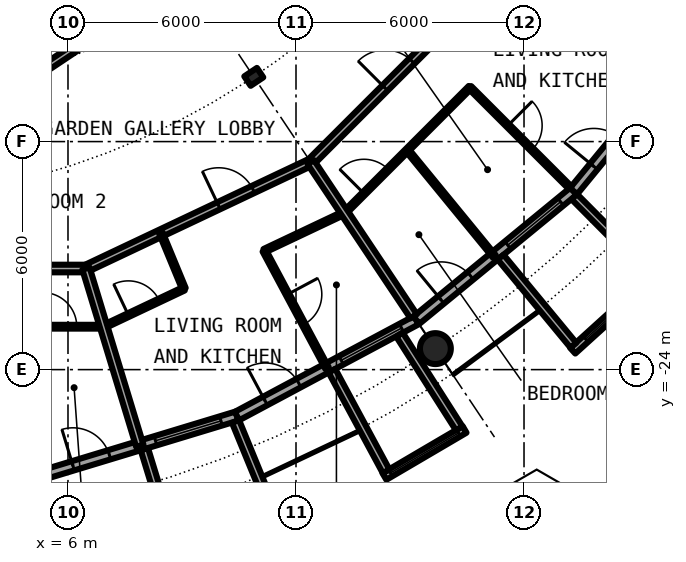
"""IFC4 building model, lengths in metres.
Left out: names, types, materials, properties, quantities, classifications, styles, units other than length and angle.
Written with IfcOpenShell. Run it as: python <this file> out.ifc"""

import sys

from ifc_helpers import new_model, si_unit, direction, frame, frame_2d, origin, origin_2d, place, context, subcontext, project, spatial, rectangle, circle, hollow_circle, i_section, extrude, element, fill, save


model = new_model("IFC4")
c1 = context("Model", 3, precision=1e-05, world=origin(), true_north=direction((0.0, 1.0)))
c2 = subcontext(c1, "Body", "Model", "MODEL_VIEW")
j1 = project(units=[si_unit("LENGTHUNIT", "METRE"), si_unit("PLANEANGLEUNIT", "RADIAN")], contexts=[c1])
p1 = place(None, origin())
s1 = spatial("IfcSite", under=j1, at=p1, CompositionType="ELEMENT")
p2 = place(p1, origin())
s2 = spatial("IfcBuilding", under=s1, at=p2, CompositionType="ELEMENT")
p3 = place(p2, frame((0.0, 0.0, 218.8)))
s3 = spatial("IfcBuildingStorey", under=s2, at=p3, CompositionType="ELEMENT", Elevation=218.8)
p4 = place(p3, frame((15.667, -23.448, 0.0), z_axis=(0.0, 0.0, 1.0), x_axis=(1.0, 0.0, 0.0)))
e1 = element("IfcColumn", 1, at=p4, inside=s3, PredefinedType="COLUMN", context=c2, shape_type="SweptSolid", body=[
    extrude(hollow_circle(Radius=0.406, WallThickness=0.03, at=origin_2d()), origin(), (0.0, 0.0, 1.0), 3.05),
])
p5 = place(p3, frame((10.889, -16.297, 0.0), z_axis=(0.0, 0.0, 1.0), x_axis=(0.55557023302, -0.831469612303, 0.0)))
e2 = element("IfcColumn", 2, at=p5, inside=s3, PredefinedType="COLUMN", context=c2, shape_type="SweptSolid", body=[
    extrude(i_section(OverallWidth=0.3, OverallDepth=0.4, WebThickness=0.013, FlangeThickness=0.024, FilletRadius=0.027, at=origin_2d()), origin(), (0.0, 0.0, 1.0), 3.05),
])
p6 = place(p3, frame((5.326, -26.775, 0.0), z_axis=(0.0, 0.0, 1.0), x_axis=(0.956965678721, 0.290201119486, 0.0)))
e3 = element("IfcWall", 3, at=p6, inside=s3, PredefinedType="SOLIDWALL", context=c2, shape_type="SweptSolid", body=[
    extrude(rectangle(XDim=5.351, YDim=0.25, at=frame_2d((2.676, 0.0))), origin(), (0.0, 0.0, 1.0), 2.65),
])
p7 = place(p6, frame((0.841, 0.0, 0.0)))
e4 = element("IfcOpeningElement", 4, at=p7, cuts=e3, PredefinedType="OPENING", context=c2, shape_type="SweptSolid", body=[
    extrude(rectangle(XDim=1.0, YDim=2.2, at=frame_2d((0.5, 1.1))), frame((0.0, 0.135, 0.0), z_axis=(0.0, -1.0, 0.0), x_axis=(1.0, 0.0, 0.0)), (0.0, 0.0, 1.0), 0.27),
])
p8 = place(p6, frame((3.111, 0.0, 0.3)))
e5 = element("IfcOpeningElement", 5, at=p8, cuts=e3, PredefinedType="OPENING", context=c2, shape_type="SweptSolid", body=[
    extrude(rectangle(XDim=1.8, YDim=2.1, at=frame_2d((0.9, 1.05))), frame((0.0, 0.135, 0.0), z_axis=(0.0, -1.0, 0.0), x_axis=(1.0, 0.0, 0.0)), (0.0, 0.0, 1.0), 0.27),
])
p9 = place(p3, frame((8.009, -26.092, -0.03), z_axis=(0.0, 0.0, 1.0), x_axis=(0.293406695073, -0.955987715029, 0.0)))
e6 = element("IfcWall", 6, at=p9, inside=s3, PredefinedType="SOLIDWALL", context=c2, shape_type="SweptSolid", body=[
    extrude(rectangle(XDim=3.006, YDim=0.2, at=frame_2d((1.503, 0.0))), origin(), (0.0, 0.0, 1.0), 2.68),
])
p10 = place(p3, frame((10.409, -25.364, -0.03), z_axis=(0.0, 0.0, 1.0), x_axis=(0.379509886562, -0.925187681501, 0.0)))
e7 = element("IfcWall", 7, at=p10, inside=s3, PredefinedType="SOLIDWALL", context=c2, shape_type="SweptSolid", body=[
    extrude(rectangle(XDim=2.883, YDim=0.2, at=frame_2d((1.441, 0.0))), origin(), (0.0, 0.0, 1.0), 2.68),
])
p11 = place(p3, frame((10.447, -25.222, 0.0), z_axis=(0.0, 0.0, 1.0), x_axis=(0.881915646801, 0.471407246368, 0.0)))
e8 = element("IfcWall", 8, at=p11, inside=s3, PredefinedType="SOLIDWALL", context=c2, shape_type="SweptSolid", body=[
    extrude(rectangle(XDim=5.352, YDim=0.25, at=frame_2d((2.676, 0.0))), origin(), (0.0, 0.0, 1.0), 2.65),
])
p12 = place(p11, frame((0.841, 0.0, 0.0)))
e9 = element("IfcOpeningElement", 9, at=p12, cuts=e8, PredefinedType="OPENING", context=c2, shape_type="SweptSolid", body=[
    extrude(rectangle(XDim=1.0, YDim=2.2, at=frame_2d((0.5, 1.1))), frame((0.0, 0.135, 0.0), z_axis=(0.0, -1.0, 0.0), x_axis=(1.0, 0.0, 0.0)), (0.0, 0.0, 1.0), 0.27),
])
p13 = place(p11, frame((3.111, 0.0, 0.3)))
e10 = element("IfcOpeningElement", 10, at=p13, cuts=e8, PredefinedType="OPENING", context=c2, shape_type="SweptSolid", body=[
    extrude(rectangle(XDim=1.8, YDim=2.1, at=frame_2d((0.9, 1.05))), frame((0.0, 0.135, 0.0), z_axis=(0.0, -1.0, 0.0), x_axis=(1.0, 0.0, 0.0)), (0.0, 0.0, 1.0), 0.27),
])
p14 = place(p3, frame((14.327, -26.812, -0.03), z_axis=(0.0, 0.0, 1.0), x_axis=(0.862403467503, 0.506221551535, 0.0)))
e11 = element("IfcWall", 11, at=p14, inside=s3, PredefinedType="SOLIDWALL", context=c2, shape_type="SweptSolid", body=[
    extrude(rectangle(XDim=2.446, YDim=0.2, at=frame_2d((1.223, 0.0))), origin(), (0.0, 0.0, 1.0), 2.68),
])
p15 = place(p14, frame((0.183, 0.0, 0.33)))
e12 = element("IfcOpeningElement", 12, at=p15, cuts=e11, PredefinedType="OPENING", context=c2, shape_type="SweptSolid", body=[
    extrude(circle(Radius=1.04, at=frame_2d((1.04, 1.04))), frame((0.0, 0.11, 0.0), z_axis=(0.0, -1.0, 0.0), x_axis=(1.0, 0.0, 0.0)), (0.0, 0.0, 1.0), 0.22),
])
p16 = place(p3, frame((12.945, -24.029, -0.03), z_axis=(0.0, 0.0, 1.0), x_axis=(0.474424310775, -0.88029629861, 0.0)))
e13 = element("IfcWall", 13, at=p16, inside=s3, PredefinedType="SOLIDWALL", context=c2, shape_type="SweptSolid", body=[
    extrude(rectangle(XDim=3.006, YDim=0.2, at=frame_2d((1.503, 0.0))), origin(), (0.0, 0.0, 1.0), 2.68),
])
p17 = place(p3, frame((14.722, -23.079, -0.03), z_axis=(0.0, 0.0, 1.0), x_axis=(0.537572179146, -0.843217737129, 0.0)))
e14 = element("IfcWall", 14, at=p17, inside=s3, PredefinedType="SOLIDWALL", context=c2, shape_type="SweptSolid", body=[
    extrude(rectangle(XDim=2.924, YDim=0.2, at=frame_2d((1.462, 0.0))), origin(), (0.0, 0.0, 1.0), 2.68),
])
p18 = place(p3, frame((15.167, -22.699, 0.0), z_axis=(0.0, 0.0, 1.0), x_axis=(0.773019449054, 0.634382322723, 0.0)))
e15 = element("IfcWall", 15, at=p18, inside=s3, PredefinedType="SOLIDWALL", context=c2, shape_type="SweptSolid", body=[
    extrude(rectangle(XDim=5.352, YDim=0.25, at=frame_2d((2.676, 0.0))), origin(), (0.0, 0.0, 1.0), 2.65),
])
p19 = place(p18, frame((0.841, 0.0, 0.0)))
e16 = element("IfcOpeningElement", 16, at=p19, cuts=e15, PredefinedType="OPENING", context=c2, shape_type="SweptSolid", body=[
    extrude(rectangle(XDim=1.0, YDim=2.2, at=frame_2d((0.5, 1.1))), frame((0.0, 0.135, 0.0), z_axis=(0.0, -1.0, 0.0), x_axis=(1.0, 0.0, 0.0)), (0.0, 0.0, 1.0), 0.27),
])
p20 = place(p18, frame((3.111, 0.0, 0.3)))
e17 = element("IfcOpeningElement", 17, at=p20, cuts=e15, PredefinedType="OPENING", context=c2, shape_type="SweptSolid", body=[
    extrude(rectangle(XDim=1.8, YDim=2.1, at=frame_2d((0.9, 1.05))), frame((0.0, 0.135, 0.0), z_axis=(0.0, -1.0, 0.0), x_axis=(1.0, 0.0, 0.0)), (0.0, 0.0, 1.0), 0.27),
])
p21 = place(p3, frame((19.282, -23.503, -0.03), z_axis=(0.0, 0.0, 1.0), x_axis=(0.740998365753, 0.671506829416, 0.0)))
e18 = element("IfcWall", 18, at=p21, inside=s3, PredefinedType="SOLIDWALL", context=c2, shape_type="SweptSolid", body=[
    extrude(rectangle(XDim=2.993, YDim=0.2, at=frame_2d((1.497, 0.0))), origin(), (0.0, 0.0, 1.0), 2.68),
])
p22 = place(p21, frame((0.457, 0.0, 0.33)))
e19 = element("IfcOpeningElement", 19, at=p22, cuts=e18, PredefinedType="OPENING", context=c2, shape_type="SweptSolid", body=[
    extrude(circle(Radius=1.04, at=frame_2d((1.04, 1.04))), frame((0.0, 0.11, 0.0), z_axis=(0.0, -1.0, 0.0), x_axis=(1.0, 0.0, 0.0)), (0.0, 0.0, 1.0), 0.22),
])
p23 = place(p3, frame((17.384, -21.041, -0.03), z_axis=(0.0, 0.0, 1.0), x_axis=(0.63709551667, -0.770784861449, 0.0)))
e20 = element("IfcWall", 20, at=p23, inside=s3, PredefinedType="SOLIDWALL", context=c2, shape_type="SweptSolid", body=[
    extrude(rectangle(XDim=3.006, YDim=0.2, at=frame_2d((1.503, 0.0))), origin(), (0.0, 0.0, 1.0), 2.68),
])
p24 = place(p3, frame((19.323, -19.45, -0.03), z_axis=(0.0, 0.0, 1.0), x_axis=(0.704476739375, -0.709727076896, 0.0)))
e21 = element("IfcWall", 21, at=p24, inside=s3, PredefinedType="SOLIDWALL", context=c2, shape_type="SweptSolid", body=[
    extrude(rectangle(XDim=2.883, YDim=0.2, at=frame_2d((1.441, 0.0))), origin(), (0.0, 0.0, 1.0), 2.68),
])
p25 = place(p3, frame((19.304, -19.304, 0.0), z_axis=(0.0, 0.0, 1.0), x_axis=(0.634382322723, 0.773019449054, 0.0)))
e22 = element("IfcWall", 22, at=p25, inside=s3, PredefinedType="SOLIDWALL", context=c2, shape_type="SweptSolid", body=[
    extrude(rectangle(XDim=5.352, YDim=0.25, at=frame_2d((2.676, 0.0))), origin(), (0.0, 0.0, 1.0), 2.65),
])
p26 = place(p25, frame((0.841, 0.0, 0.0)))
e23 = element("IfcOpeningElement", 23, at=p26, cuts=e22, PredefinedType="OPENING", context=c2, shape_type="SweptSolid", body=[
    extrude(rectangle(XDim=1.0, YDim=2.2, at=frame_2d((0.5, 1.1))), frame((0.0, 0.135, 0.0), z_axis=(0.0, -1.0, 0.0), x_axis=(1.0, 0.0, 0.0)), (0.0, 0.0, 1.0), 0.27),
])
p27 = place(p25, frame((3.111, 0.0, 0.3)))
e24 = element("IfcOpeningElement", 24, at=p27, cuts=e22, PredefinedType="OPENING", context=c2, shape_type="SweptSolid", body=[
    extrude(rectangle(XDim=1.8, YDim=2.1, at=frame_2d((0.9, 1.05))), frame((0.0, 0.135, 0.0), z_axis=(0.0, -1.0, 0.0), x_axis=(1.0, 0.0, 0.0)), (0.0, 0.0, 1.0), 0.27),
])
p28 = place(p3, frame((6.939, -22.872, 0.0), z_axis=(0.0, 0.0, 1.0), x_axis=(0.903888765148, 0.427767577359, 0.0)))
e25 = element("IfcWall", 25, at=p28, inside=s3, PredefinedType="PARTITIONING", context=c2, shape_type="SweptSolid", body=[
    extrude(rectangle(XDim=2.338, YDim=0.1, at=frame_2d((1.169, 0.0))), origin(), (0.0, 0.0, 1.0), 2.65),
])
p29 = place(p28, frame((0.718, 0.0, 0.0)))
e26 = element("IfcOpeningElement", 26, at=p29, cuts=e25, PredefinedType="OPENING", context=c2, shape_type="SweptSolid", body=[
    extrude(rectangle(XDim=0.9, YDim=2.3, at=frame_2d((0.45, 1.15))), frame((0.0, 0.06, 0.0), z_axis=(0.0, -1.0, 0.0), x_axis=(1.0, 0.0, 0.0)), (0.0, 0.0, 1.0), 0.12),
])
p30 = place(p3, frame((11.165, -20.872, 0.0), z_axis=(0.0, 0.0, 1.0), x_axis=(0.903888765148, 0.427767577359, 0.0)))
e27 = element("IfcWall", 27, at=p30, inside=s3, PredefinedType="PARTITIONING", context=c2, shape_type="SweptSolid", body=[
    extrude(rectangle(XDim=2.338, YDim=0.1, at=frame_2d((1.169, 0.0))), origin(), (0.0, 0.0, 1.0), 2.65),
])
p31 = place(p3, frame((13.285, -19.869, 0.0), z_axis=(0.0, 0.0, 1.0), x_axis=(0.706923494552, 0.707290020325, 0.0)))
e28 = element("IfcWall", 28, at=p31, inside=s3, PredefinedType="PARTITIONING", context=c2, shape_type="SweptSolid", body=[
    extrude(rectangle(XDim=4.663, YDim=0.1, at=frame_2d((2.331, 0.0))), origin(), (0.0, 0.0, 1.0), 2.65),
])
p32 = place(p31, frame((0.712, 0.0, 0.0)))
e29 = element("IfcOpeningElement", 29, at=p32, cuts=e28, PredefinedType="OPENING", context=c2, shape_type="SweptSolid", body=[
    extrude(rectangle(XDim=0.9, YDim=2.3, at=frame_2d((0.45, 1.15))), frame((0.0, 0.06, 0.0), z_axis=(0.0, -1.0, 0.0), x_axis=(1.0, 0.0, 0.0)), (0.0, 0.0, 1.0), 0.12),
])
p33 = place(p3, frame((0.0, -22.871, 0.0), z_axis=(0.0, 0.0, 1.0), x_axis=(1.0, 0.0, 0.0)))
e30 = element("IfcWall", 30, at=p33, inside=s3, PredefinedType="PARTITIONING", context=c2, shape_type="SweptSolid", body=[
    extrude(rectangle(XDim=6.938, YDim=0.1, at=frame_2d((3.469, 0.0))), origin(), (0.0, 0.0, 1.0), 2.65),
])
p34 = place(p33, frame((3.019, 0.0, 0.0)))
e31 = element("IfcOpeningElement", 31, at=p34, cuts=e30, PredefinedType="OPENING", context=c2, shape_type="SweptSolid", body=[
    extrude(rectangle(XDim=0.9, YDim=2.3, at=frame_2d((0.45, 1.15))), frame((0.0, 0.06, 0.0), z_axis=(0.0, -1.0, 0.0), x_axis=(1.0, 0.0, 0.0)), (0.0, 0.0, 1.0), 0.12),
])
p35 = place(p33, frame((5.331, 0.0, 0.0)))
e32 = element("IfcOpeningElement", 32, at=p35, cuts=e30, PredefinedType="OPENING", context=c2, shape_type="SweptSolid", body=[
    extrude(rectangle(XDim=0.9, YDim=2.3, at=frame_2d((0.45, 1.15))), frame((0.0, 0.06, 0.0), z_axis=(0.0, -1.0, 0.0), x_axis=(1.0, 0.0, 0.0)), (0.0, 0.0, 1.0), 0.12),
])
p36 = place(p3, frame((6.469, -21.342, 0.0), z_axis=(0.0, 0.0, 1.0), x_axis=(0.90398136628, 0.427571852931, 0.0)))
e33 = element("IfcWall", 33, at=p36, inside=s3, PredefinedType="PARTITIONING", context=c2, shape_type="SweptSolid", body=[
    extrude(rectangle(XDim=6.549, YDim=0.2, at=frame_2d((3.274, 0.0))), origin(), (0.0, 0.0, 1.0), 2.65),
])
p37 = place(p36, frame((3.867, 0.0, 0.0)))
e34 = element("IfcOpeningElement", 34, at=p37, cuts=e33, PredefinedType="OPENING", context=c2, shape_type="SweptSolid", body=[
    extrude(rectangle(XDim=1.0, YDim=2.3, at=frame_2d((0.5, 1.15))), frame((0.0, 0.11, 0.0), z_axis=(0.0, -1.0, 0.0), x_axis=(1.0, 0.0, 0.0)), (0.0, 0.0, 1.0), 0.22),
])
p38 = place(p3, frame((12.389, -18.542, 0.0), z_axis=(0.0, 0.0, 1.0), x_axis=(0.707106781187, 0.707106781187, 0.0)))
e35 = element("IfcWall", 35, at=p38, inside=s3, PredefinedType="PARTITIONING", context=c2, shape_type="SweptSolid", body=[
    extrude(rectangle(XDim=8.702, YDim=0.2, at=frame_2d((4.351, 0.0))), origin(), (0.0, 0.0, 1.0), 2.65),
])
p39 = place(p38, frame((2.763, 0.0, 0.0)))
e36 = element("IfcOpeningElement", 36, at=p39, cuts=e35, PredefinedType="OPENING", context=c2, shape_type="SweptSolid", body=[
    extrude(rectangle(XDim=1.0, YDim=2.3, at=frame_2d((0.5, 1.15))), frame((0.0, 0.11, 0.0), z_axis=(0.0, -1.0, 0.0), x_axis=(1.0, 0.0, 0.0)), (0.0, 0.0, 1.0), 0.22),
])
p40 = place(p3, frame((-6.473, -21.34, 0.0), z_axis=(0.0, 0.0, 1.0), x_axis=(1.0, 0.0, 0.0)))
e37 = element("IfcWall", 37, at=p40, inside=s3, PredefinedType="PARTITIONING", context=c2, shape_type="SweptSolid", body=[
    extrude(rectangle(XDim=12.946, YDim=0.2, at=frame_2d((6.473, 0.0))), origin(), (0.0, 0.0, 1.0), 2.65),
])
p41 = place(p40, frame((7.051, 0.0, 0.0)))
e38 = element("IfcOpeningElement", 38, at=p41, cuts=e37, PredefinedType="OPENING", context=c2, shape_type="SweptSolid", body=[
    extrude(rectangle(XDim=1.0, YDim=2.3, at=frame_2d((0.5, 1.15))), frame((0.0, 0.11, 0.0), z_axis=(0.0, -1.0, 0.0), x_axis=(1.0, 0.0, 0.0)), (0.0, 0.0, 1.0), 0.22),
])
p42 = place(p3, frame((3.451, -17.361, 0.0), z_axis=(0.0, 0.0, 1.0), x_axis=(0.831492679744, 0.555535708603, 0.0)))
e39 = element("IfcWall", 39, at=p42, inside=s3, PredefinedType="PARTITIONING", context=c2, shape_type="SweptSolid", body=[
    extrude(rectangle(XDim=13.549, YDim=0.2, at=frame_2d((6.775, 0.0))), origin(), (0.0, 0.0, 1.0), 2.65),
])
p43 = place(p42, frame((4.583, 0.0, 0.0)))
e40 = element("IfcOpeningElement", 40, at=p43, cuts=e39, PredefinedType="OPENING", context=c2, shape_type="SweptSolid", body=[
    extrude(rectangle(XDim=1.0, YDim=2.3, at=frame_2d((0.5, 1.15))), frame((0.0, 0.11, 0.0), z_axis=(0.0, -1.0, 0.0), x_axis=(1.0, 0.0, 0.0)), (0.0, 0.0, 1.0), 0.22),
])
p44 = place(p3, frame((6.473, -21.34, 0.0), z_axis=(0.0, 0.0, 1.0), x_axis=(0.290705166682, -0.956812680761, 0.0)))
e41 = element("IfcWall", 41, at=p44, inside=s3, PredefinedType="PARTITIONING", context=c2, shape_type="SweptSolid", body=[
    extrude(rectangle(XDim=4.874, YDim=0.2, at=frame_2d((2.437, 0.0))), origin(), (0.0, 0.0, 1.0), 2.65),
])
p45 = place(p3, frame((8.445, -20.407, 0.0), z_axis=(0.0, 0.0, 1.0), x_axis=(0.38241529907, -0.923990551379, 0.0)))
e42 = element("IfcWall", 42, at=p45, inside=s3, PredefinedType="PARTITIONING", context=c2, shape_type="SweptSolid", body=[
    extrude(rectangle(XDim=1.584, YDim=0.1, at=frame_2d((0.792, 0.0))), origin(), (0.0, 0.0, 1.0), 2.65),
])
p46 = place(p3, frame((11.165, -20.872, 0.0), z_axis=(0.0, 0.0, 1.0), x_axis=(0.471734135207, -0.881740838161, 0.0)))
e43 = element("IfcWall", 43, at=p46, inside=s3, PredefinedType="PARTITIONING", context=c2, shape_type="SweptSolid", body=[
    extrude(rectangle(XDim=3.504, YDim=0.1, at=frame_2d((1.752, 0.0))), origin(), (0.0, 0.0, 1.0), 2.65),
])
p47 = place(p46, frame((1.302, 0.0, 0.0)))
e44 = element("IfcOpeningElement", 44, at=p47, cuts=e43, PredefinedType="OPENING", context=c2, shape_type="SweptSolid", body=[
    extrude(rectangle(XDim=0.9, YDim=2.3, at=frame_2d((0.45, 1.15))), frame((0.0, 0.06, 0.0), z_axis=(0.0, -1.0, 0.0), x_axis=(1.0, 0.0, 0.0)), (0.0, 0.0, 1.0), 0.12),
])
p48 = place(p3, frame((12.388, -18.543, 0.0), z_axis=(0.0, 0.0, 1.0), x_axis=(0.55555521993, -0.831479643532, 0.0)))
e45 = element("IfcWall", 45, at=p48, inside=s3, PredefinedType="PARTITIONING", context=c2, shape_type="SweptSolid", body=[
    extrude(rectangle(XDim=4.875, YDim=0.2, at=frame_2d((2.437, 0.0))), origin(), (0.0, 0.0, 1.0), 2.65),
])
p49 = place(p3, frame((14.927, -18.224, 0.0), z_axis=(0.0, 0.0, 1.0), x_axis=(0.633737383709, -0.773548271597, 0.0)))
e46 = element("IfcWall", 46, at=p49, inside=s3, PredefinedType="PARTITIONING", context=c2, shape_type="SweptSolid", body=[
    extrude(rectangle(XDim=3.618, YDim=0.1, at=frame_2d((1.809, 0.0))), origin(), (0.0, 0.0, 1.0), 2.65),
])
p50 = place(p3, frame((16.575, -16.575, 0.0), z_axis=(0.0, 0.0, 1.0), x_axis=(0.707106781187, -0.707106781187, 0.0)))
e47 = element("IfcWall", 47, at=p50, inside=s3, PredefinedType="PARTITIONING", context=c2, shape_type="SweptSolid", body=[
    extrude(rectangle(XDim=3.735, YDim=0.1, at=frame_2d((1.868, 0.0))), origin(), (0.0, 0.0, 1.0), 2.65),
])
p51 = place(p50, frame((1.417, 0.0, 0.0)))
e48 = element("IfcOpeningElement", 48, at=p51, cuts=e47, PredefinedType="OPENING", context=c2, shape_type="SweptSolid", body=[
    extrude(rectangle(XDim=0.9, YDim=2.3, at=frame_2d((0.45, 1.15))), frame((0.0, 0.06, 0.0), z_axis=(0.0, -1.0, 0.0), x_axis=(1.0, 0.0, 0.0)), (0.0, 0.0, 1.0), 0.12),
])
p52 = place(p7, origin())
e49 = element("IfcDoor", 49, at=p52, inside=s3, OperationType="SINGLE_SWING_LEFT", PredefinedType="DOOR", context=c2, shape_type="SweptSolid", body=[
    extrude(rectangle(XDim=1.0, YDim=2.2, at=frame_2d((0.5, 1.1))), frame((0.0, 0.025, 0.0), z_axis=(0.0, -1.0, 0.0), x_axis=(1.0, 0.0, 0.0)), (0.0, 0.0, 1.0), 0.05),
])
fill(e4, e49)
p53 = place(p8, origin())
e50 = element("IfcWindow", 50, at=p53, inside=s3, PartitioningType="SINGLE_PANEL", PredefinedType="WINDOW", context=c2, shape_type="SweptSolid", body=[
    extrude(rectangle(XDim=1.8, YDim=2.1, at=frame_2d((0.9, 1.05))), frame((0.0, 0.03, 0.0), z_axis=(0.0, -1.0, 0.0), x_axis=(1.0, 0.0, 0.0)), (0.0, 0.0, 1.0), 0.06),
])
fill(e5, e50)
p54 = place(p12, origin())
e51 = element("IfcDoor", 51, at=p54, inside=s3, OperationType="SINGLE_SWING_LEFT", PredefinedType="DOOR", context=c2, shape_type="SweptSolid", body=[
    extrude(rectangle(XDim=1.0, YDim=2.2, at=frame_2d((0.5, 1.1))), frame((0.0, 0.025, 0.0), z_axis=(0.0, -1.0, 0.0), x_axis=(1.0, 0.0, 0.0)), (0.0, 0.0, 1.0), 0.05),
])
fill(e9, e51)
p55 = place(p13, origin())
e52 = element("IfcWindow", 52, at=p55, inside=s3, PartitioningType="SINGLE_PANEL", PredefinedType="WINDOW", context=c2, shape_type="SweptSolid", body=[
    extrude(rectangle(XDim=1.8, YDim=2.1, at=frame_2d((0.9, 1.05))), frame((0.0, 0.03, 0.0), z_axis=(0.0, -1.0, 0.0), x_axis=(1.0, 0.0, 0.0)), (0.0, 0.0, 1.0), 0.06),
])
fill(e10, e52)
p56 = place(p15, origin())
e53 = element("IfcWindow", 53, at=p56, inside=s3, PartitioningType="SINGLE_PANEL", PredefinedType="WINDOW", context=c2, shape_type="SweptSolid", body=[
    extrude(circle(Radius=1.04, at=frame_2d((1.04, 1.04))), frame((0.0, 0.03, 0.0), z_axis=(0.0, -1.0, 0.0), x_axis=(1.0, 0.0, 0.0)), (0.0, 0.0, 1.0), 0.06),
])
fill(e12, e53)
p57 = place(p19, origin())
e54 = element("IfcDoor", 54, at=p57, inside=s3, OperationType="SINGLE_SWING_LEFT", PredefinedType="DOOR", context=c2, shape_type="SweptSolid", body=[
    extrude(rectangle(XDim=1.0, YDim=2.2, at=frame_2d((0.5, 1.1))), frame((0.0, 0.025, 0.0), z_axis=(0.0, -1.0, 0.0), x_axis=(1.0, 0.0, 0.0)), (0.0, 0.0, 1.0), 0.05),
])
fill(e16, e54)
p58 = place(p20, origin())
e55 = element("IfcWindow", 55, at=p58, inside=s3, PartitioningType="SINGLE_PANEL", PredefinedType="WINDOW", context=c2, shape_type="SweptSolid", body=[
    extrude(rectangle(XDim=1.8, YDim=2.1, at=frame_2d((0.9, 1.05))), frame((0.0, 0.03, 0.0), z_axis=(0.0, -1.0, 0.0), x_axis=(1.0, 0.0, 0.0)), (0.0, 0.0, 1.0), 0.06),
])
fill(e17, e55)
p59 = place(p22, origin())
e56 = element("IfcWindow", 56, at=p59, inside=s3, PartitioningType="SINGLE_PANEL", PredefinedType="WINDOW", context=c2, shape_type="SweptSolid", body=[
    extrude(circle(Radius=1.04, at=frame_2d((1.04, 1.04))), frame((0.0, 0.03, 0.0), z_axis=(0.0, -1.0, 0.0), x_axis=(1.0, 0.0, 0.0)), (0.0, 0.0, 1.0), 0.06),
])
fill(e19, e56)
p60 = place(p26, origin())
e57 = element("IfcDoor", 57, at=p60, inside=s3, OperationType="SINGLE_SWING_LEFT", PredefinedType="DOOR", context=c2, shape_type="SweptSolid", body=[
    extrude(rectangle(XDim=1.0, YDim=2.2, at=frame_2d((0.5, 1.1))), frame((0.0, 0.025, 0.0), z_axis=(0.0, -1.0, 0.0), x_axis=(1.0, 0.0, 0.0)), (0.0, 0.0, 1.0), 0.05),
])
fill(e23, e57)
p61 = place(p35, origin())
e58 = element("IfcDoor", 58, at=p61, inside=s3, OperationType="SINGLE_SWING_RIGHT", PredefinedType="DOOR", context=c2, shape_type="SweptSolid", body=[
    extrude(rectangle(XDim=0.9, YDim=2.3, at=frame_2d((0.45, 1.15))), frame((0.0, 0.025, 0.0), z_axis=(0.0, -1.0, 0.0), x_axis=(1.0, 0.0, 0.0)), (0.0, 0.0, 1.0), 0.05),
])
fill(e32, e58)
p62 = place(p37, origin())
e59 = element("IfcDoor", 59, at=p62, inside=s3, OperationType="SINGLE_SWING_RIGHT", PredefinedType="DOOR", context=c2, shape_type="SweptSolid", body=[
    extrude(rectangle(XDim=1.0, YDim=2.3, at=frame_2d((0.5, 1.15))), frame((0.0, 0.025, 0.0), z_axis=(0.0, -1.0, 0.0), x_axis=(1.0, 0.0, 0.0)), (0.0, 0.0, 1.0), 0.05),
])
fill(e34, e59)
p63 = place(p29, origin())
e60 = element("IfcDoor", 60, at=p63, inside=s3, OperationType="SINGLE_SWING_LEFT", PredefinedType="DOOR", context=c2, shape_type="SweptSolid", body=[
    extrude(rectangle(XDim=0.9, YDim=2.3, at=frame_2d((0.45, 1.15))), frame((0.0, 0.025, 0.0), z_axis=(0.0, -1.0, 0.0), x_axis=(1.0, 0.0, 0.0)), (0.0, 0.0, 1.0), 0.05),
])
fill(e26, e60)
p64 = place(p47, origin())
e61 = element("IfcDoor", 61, at=p64, inside=s3, OperationType="SINGLE_SWING_RIGHT", PredefinedType="DOOR", context=c2, shape_type="SweptSolid", body=[
    extrude(rectangle(XDim=0.9, YDim=2.3, at=frame_2d((0.45, 1.15))), frame((0.0, 0.025, 0.0), z_axis=(0.0, -1.0, 0.0), x_axis=(1.0, 0.0, 0.0)), (0.0, 0.0, 1.0), 0.05),
])
fill(e44, e61)
p65 = place(p39, origin())
e62 = element("IfcDoor", 62, at=p65, inside=s3, OperationType="SINGLE_SWING_LEFT", PredefinedType="DOOR", context=c2, shape_type="SweptSolid", body=[
    extrude(rectangle(XDim=1.0, YDim=2.3, at=frame_2d((0.5, 1.15))), frame((0.0, 0.025, 0.0), z_axis=(0.0, -1.0, 0.0), x_axis=(1.0, 0.0, 0.0)), (0.0, 0.0, 1.0), 0.05),
])
fill(e36, e62)
p66 = place(p51, origin())
e63 = element("IfcDoor", 63, at=p66, inside=s3, OperationType="SINGLE_SWING_RIGHT", PredefinedType="DOOR", context=c2, shape_type="SweptSolid", body=[
    extrude(rectangle(XDim=0.9, YDim=2.3, at=frame_2d((0.45, 1.15))), frame((0.0, 0.025, 0.0), z_axis=(0.0, -1.0, 0.0), x_axis=(1.0, 0.0, 0.0)), (0.0, 0.0, 1.0), 0.05),
])
fill(e48, e63)
p67 = place(p32, origin())
e64 = element("IfcDoor", 64, at=p67, inside=s3, OperationType="SINGLE_SWING_LEFT", PredefinedType="DOOR", context=c2, shape_type="SweptSolid", body=[
    extrude(rectangle(XDim=0.9, YDim=2.3, at=frame_2d((0.45, 1.15))), frame((0.0, 0.025, 0.0), z_axis=(0.0, -1.0, 0.0), x_axis=(1.0, 0.0, 0.0)), (0.0, 0.0, 1.0), 0.05),
])
fill(e29, e64)
save(model, sys.argv[1])
